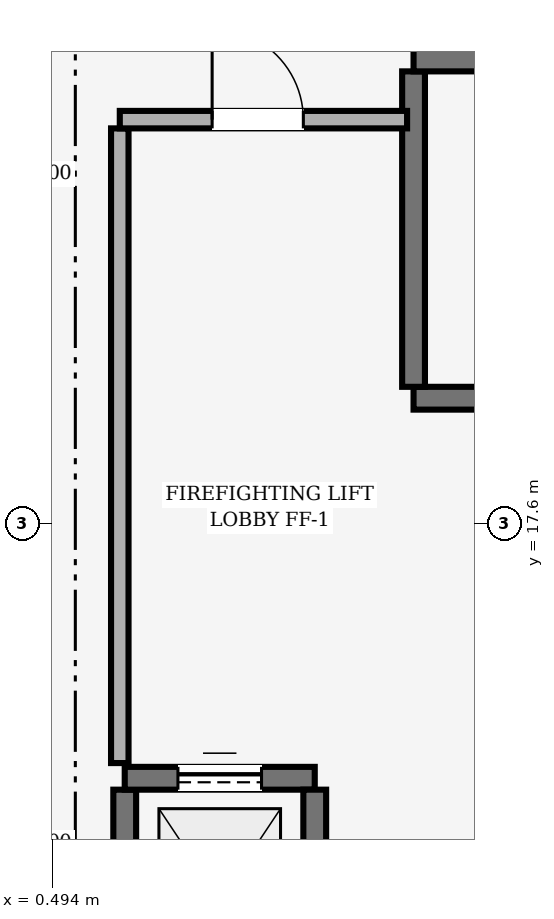
"""IFC4 building model, lengths in metres.
Left out: names, types, materials, properties, quantities, classifications, styles, units other than length and angle.
Written with IfcOpenShell. Run it as: python <this file> out.ifc"""

import sys

from ifc_helpers import new_model, si_unit, direction, frame, frame_2d, origin, place, context, subcontext, project, spatial, rectangle, extrude, element, fill, save


model = new_model("IFC4")
c1 = context("Model", 3, precision=1e-05, world=origin(), true_north=direction((0.0, 1.0)))
c2 = subcontext(c1, "Body", "Model", "MODEL_VIEW")
j1 = project(units=[si_unit("LENGTHUNIT", "METRE"), si_unit("PLANEANGLEUNIT", "RADIAN")], contexts=[c1])
p1 = place(None, origin())
s1 = spatial("IfcSite", under=j1, at=p1, CompositionType="ELEMENT")
p2 = place(p1, origin())
s2 = spatial("IfcBuilding", under=s1, at=p2, CompositionType="ELEMENT")
p3 = place(p2, frame((0.0, 0.0, -4.2)))
s3 = spatial("IfcBuildingStorey", under=s2, at=p3, CompositionType="ELEMENT", Elevation=-4.2)
p4 = place(p3, frame((15.43, 19.25, 0.0), z_axis=(0.0, 0.0, 1.0), x_axis=(-1.0, 0.0, 0.0)))
e1 = element("IfcWall", 1, at=p4, inside=s3, PredefinedType="SHEAR", context=c2, shape_type="SweptSolid", body=[
    extrude(rectangle(XDim=10.18, YDim=0.3, at=frame_2d((5.09, 0.0))), origin(), (0.0, 0.0, 1.0), 3.92),
])
p5 = place(p3, frame((5.25, 19.4, 0.0), z_axis=(0.0, 0.0, 1.0), x_axis=(0.0, 1.0, 0.0)))
e2 = element("IfcWall", 2, at=p5, inside=s3, PredefinedType="SHEAR", context=c2, shape_type="SweptSolid", body=[
    extrude(rectangle(XDim=4.15, YDim=0.3, at=frame_2d((2.075, 0.0))), origin(), (0.0, 0.0, 1.0), 3.92),
])
p6 = place(p3, frame((5.25, 23.7, 0.0), z_axis=(0.0, 0.0, 1.0), x_axis=(1.0, 0.0, 0.0)))
e3 = element("IfcWall", 3, at=p6, inside=s3, PredefinedType="SHEAR", context=c2, shape_type="SweptSolid", body=[
    extrude(rectangle(XDim=10.18, YDim=0.3, at=frame_2d((5.09, 0.0))), origin(), (0.0, 0.0, 1.0), 3.92),
])
p7 = place(p3, frame((1.45, 11.2, 0.0), z_axis=(0.0, 0.0, 1.0), x_axis=(0.0, 1.0, 0.0)))
e4 = element("IfcWall", 4, at=p7, inside=s3, PredefinedType="SHEAR", context=c2, shape_type="SweptSolid", body=[
    extrude(rectangle(XDim=2.9, YDim=0.3, at=frame_2d((1.45, 0.0))), origin(), (0.0, 0.0, 1.0), 3.92),
])
p8 = place(p3, frame((1.45, 14.25, 0.0), z_axis=(0.0, 0.0, 1.0), x_axis=(1.0, 0.0, 0.0)))
e5 = element("IfcWall", 5, at=p8, inside=s3, PredefinedType="SHEAR", context=c2, shape_type="SweptSolid", body=[
    extrude(rectangle(XDim=2.5, YDim=0.3, at=frame_2d((1.25, 0.0))), origin(), (0.0, 0.0, 1.0), 3.92),
])
p9 = place(p8, frame((0.7, 0.0, 0.0)))
e6 = element("IfcOpeningElement", 6, at=p9, cuts=e5, PredefinedType="OPENING", context=c2, shape_type="SweptSolid", body=[
    extrude(rectangle(XDim=1.1, YDim=2.1, at=frame_2d((0.55, 1.05))), frame((0.0, 0.15, 0.0), z_axis=(0.0, -1.0, 0.0), x_axis=(1.0, 0.0, 0.0)), (0.0, 0.0, 1.0), 0.3),
])
p10 = place(p3, frame((3.95, 14.1, 0.0), z_axis=(0.0, 0.0, 1.0), x_axis=(0.0, -1.0, 0.0)))
e7 = element("IfcWall", 7, at=p10, inside=s3, PredefinedType="SHEAR", context=c2, shape_type="SweptSolid", body=[
    extrude(rectangle(XDim=2.9, YDim=0.3, at=frame_2d((1.45, 0.0))), origin(), (0.0, 0.0, 1.0), 3.92),
])
p11 = place(p3, frame((1.385, 14.45, 0.0), z_axis=(0.0, 0.0, 1.0), x_axis=(0.0, 1.0, 0.0)))
e8 = element("IfcWall", 8, at=p11, inside=s3, PredefinedType="PARTITIONING", context=c2, shape_type="SweptSolid", body=[
    extrude(rectangle(XDim=8.35, YDim=0.23, at=frame_2d((4.175, 0.0))), origin(), (0.0, 0.0, 1.0), 3.9),
])
p12 = place(p3, frame((1.385, 22.915, 0.0), z_axis=(0.0, 0.0, 1.0), x_axis=(1.0, 0.0, 0.0)))
e9 = element("IfcWall", 9, at=p12, inside=s3, PredefinedType="PARTITIONING", context=c2, shape_type="SweptSolid", body=[
    extrude(rectangle(XDim=3.78, YDim=0.23, at=frame_2d((1.89, 0.0))), origin(), (0.0, 0.0, 1.0), 3.9),
])
p13 = place(p12, frame((1.215, 0.0, 0.0)))
e10 = element("IfcOpeningElement", 10, at=p13, cuts=e9, PredefinedType="OPENING", context=c2, shape_type="SweptSolid", body=[
    extrude(rectangle(XDim=1.2, YDim=2.15, at=frame_2d((0.6, 1.075))), frame((0.0, 0.115, 0.0), z_axis=(0.0, -1.0, 0.0), x_axis=(1.0, 0.0, 0.0)), (0.0, 0.0, 1.0), 0.23),
])
p14 = place(p9, origin())
e11 = element("IfcDoor", 11, at=p14, inside=s3, OperationType="SLIDING_TO_LEFT", PredefinedType="DOOR", context=c2, shape_type="SweptSolid", body=[
    extrude(rectangle(XDim=1.1, YDim=2.1, at=frame_2d((0.55, 1.05))), frame((0.0, 0.025, 0.0), z_axis=(0.0, -1.0, 0.0), x_axis=(1.0, 0.0, 0.0)), (0.0, 0.0, 1.0), 0.05),
])
fill(e6, e11)
p15 = place(p13, origin())
e12 = element("IfcDoor", 12, at=p15, inside=s3, OperationType="SINGLE_SWING_LEFT", PredefinedType="DOOR", context=c2, shape_type="SweptSolid", body=[
    extrude(rectangle(XDim=1.2, YDim=2.15, at=frame_2d((0.6, 1.075))), frame((0.0, 0.025, 0.0), z_axis=(0.0, -1.0, 0.0), x_axis=(1.0, 0.0, 0.0)), (0.0, 0.0, 1.0), 0.05),
])
fill(e10, e12)
save(model, sys.argv[1])
